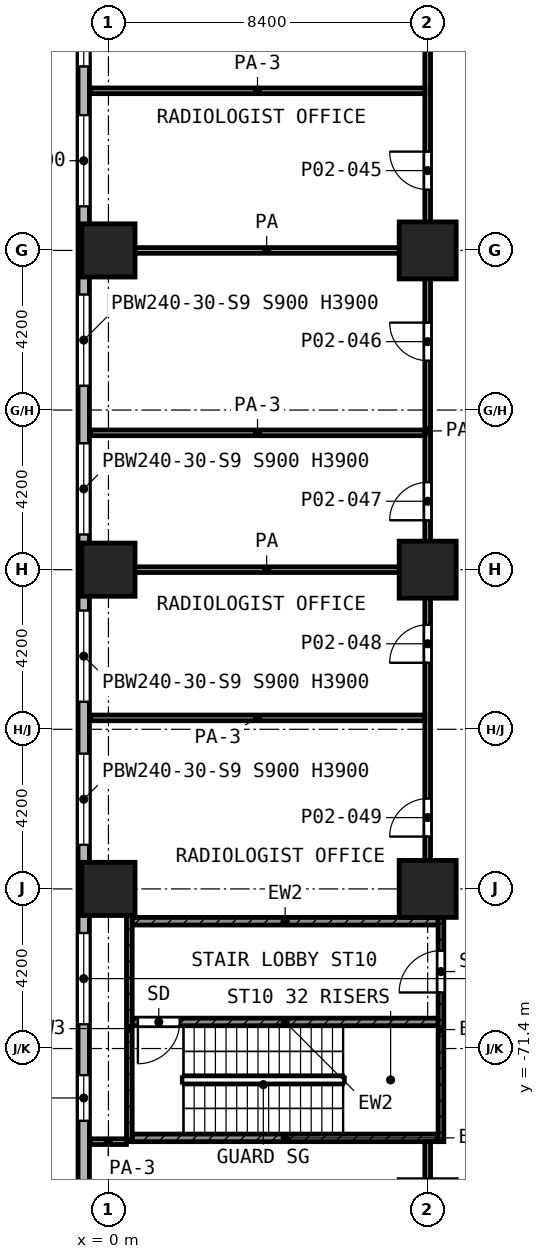
"""IFC4 building model, lengths in metres.
Left out: names, types, materials, properties, quantities, classifications, styles, units other than length and angle.
Written with IfcOpenShell. Run it as: python <this file> out.ifc"""

import sys

from ifc_helpers import new_model, si_unit, direction, frame, frame_2d, origin, origin_2d, place, context, subcontext, project, spatial, rectangle, extrude, element, fill, save


model = new_model("IFC4")
c1 = context("Model", 3, precision=1e-05, world=origin(), true_north=direction((0.0, 1.0)))
c2 = subcontext(c1, "Body", "Model", "MODEL_VIEW")
j1 = project(units=[si_unit("LENGTHUNIT", "METRE"), si_unit("PLANEANGLEUNIT", "RADIAN")], contexts=[c1])
p1 = place(None, origin())
s1 = spatial("IfcSite", under=j1, at=p1, CompositionType="ELEMENT")
p2 = place(p1, origin())
s2 = spatial("IfcBuilding", under=s1, at=p2, CompositionType="ELEMENT")
p3 = place(p2, frame((0.0, 0.0, 7.0)))
s3 = spatial("IfcBuildingStorey", under=s2, at=p3, CompositionType="ELEMENT", Elevation=7.0)
p4 = place(p3, frame((0.0, -50.4, 0.0), z_axis=(0.0, 0.0, 1.0), x_axis=(1.0, 0.0, 0.0)))
e1 = element("IfcColumn", 1, at=p4, inside=s3, PredefinedType="COLUMN", context=c2, shape_type="SweptSolid", body=[
    extrude(rectangle(XDim=1.4, YDim=1.4, at=origin_2d()), origin(), (0.0, 0.0, 1.0), 5.6),
])
p5 = place(p3, frame((8.4, -50.4, 0.0), z_axis=(0.0, 0.0, 1.0), x_axis=(1.0, 0.0, 0.0)))
e2 = element("IfcColumn", 2, at=p5, inside=s3, PredefinedType="COLUMN", context=c2, shape_type="SweptSolid", body=[
    extrude(rectangle(XDim=1.5, YDim=1.5, at=origin_2d()), origin(), (0.0, 0.0, 1.0), 5.6),
])
p6 = place(p3, frame((0.0, -58.8, 0.0), z_axis=(0.0, 0.0, 1.0), x_axis=(1.0, 0.0, 0.0)))
e3 = element("IfcColumn", 3, at=p6, inside=s3, PredefinedType="COLUMN", context=c2, shape_type="SweptSolid", body=[
    extrude(rectangle(XDim=1.4, YDim=1.4, at=origin_2d()), origin(), (0.0, 0.0, 1.0), 5.6),
])
p7 = place(p3, frame((8.4, -58.8, 0.0), z_axis=(0.0, 0.0, 1.0), x_axis=(1.0, 0.0, 0.0)))
e4 = element("IfcColumn", 4, at=p7, inside=s3, PredefinedType="COLUMN", context=c2, shape_type="SweptSolid", body=[
    extrude(rectangle(XDim=1.5, YDim=1.5, at=origin_2d()), origin(), (0.0, 0.0, 1.0), 5.6),
])
p8 = place(p3, frame((0.0, -67.2, 0.0), z_axis=(0.0, 0.0, 1.0), x_axis=(1.0, 0.0, 0.0)))
e5 = element("IfcColumn", 5, at=p8, inside=s3, PredefinedType="COLUMN", context=c2, shape_type="SweptSolid", body=[
    extrude(rectangle(XDim=1.4, YDim=1.4, at=origin_2d()), origin(), (0.0, 0.0, 1.0), 5.6),
])
p9 = place(p3, frame((8.4, -67.2, 0.0), z_axis=(0.0, 0.0, 1.0), x_axis=(1.0, 0.0, 0.0)))
e6 = element("IfcColumn", 6, at=p9, inside=s3, PredefinedType="COLUMN", context=c2, shape_type="SweptSolid", body=[
    extrude(rectangle(XDim=1.5, YDim=1.5, at=origin_2d()), origin(), (0.0, 0.0, 1.0), 5.6),
])
p10 = place(p3, frame((-0.65, -5.262, 0.0), z_axis=(0.0, 0.0, 1.0), x_axis=(0.0, -1.0, 0.0)))
e7 = element("IfcWall", 7, at=p10, inside=s3, PredefinedType="SOLIDWALL", context=c2, shape_type="SweptSolid", body=[
    extrude(rectangle(XDim=73.476, YDim=0.3, at=frame_2d((36.738, 0.0))), origin(), (0.0, 0.0, 1.0), 5.25),
])
p11 = place(p10, frame((1.61, 0.0, 0.9)))
e8 = element("IfcOpeningElement", 8, at=p11, cuts=e7, PredefinedType="OPENING", context=c2, shape_type="SweptSolid", body=[
    extrude(rectangle(XDim=1.2, YDim=3.0, at=frame_2d((0.6, 1.5))), frame((0.0, 0.16, 0.0), z_axis=(0.0, -1.0, 0.0), x_axis=(1.0, 0.0, 0.0)), (0.0, 0.0, 1.0), 0.32),
])
p12 = place(p10, frame((4.123, 0.0, 0.9)))
e9 = element("IfcOpeningElement", 9, at=p12, cuts=e7, PredefinedType="OPENING", context=c2, shape_type="SweptSolid", body=[
    extrude(rectangle(XDim=2.4, YDim=3.0, at=frame_2d((1.2, 1.5))), frame((0.0, 0.16, 0.0), z_axis=(0.0, -1.0, 0.0), x_axis=(1.0, 0.0, 0.0)), (0.0, 0.0, 1.0), 0.32),
])
p13 = place(p10, frame((7.978, 0.0, 0.9)))
e10 = element("IfcOpeningElement", 10, at=p13, cuts=e7, PredefinedType="OPENING", context=c2, shape_type="SweptSolid", body=[
    extrude(rectangle(XDim=2.4, YDim=3.0, at=frame_2d((1.2, 1.5))), frame((0.0, 0.16, 0.0), z_axis=(0.0, -1.0, 0.0), x_axis=(1.0, 0.0, 0.0)), (0.0, 0.0, 1.0), 0.32),
])
p14 = place(p10, frame((12.698, 0.0, 0.9)))
e11 = element("IfcOpeningElement", 11, at=p14, cuts=e7, PredefinedType="OPENING", context=c2, shape_type="SweptSolid", body=[
    extrude(rectangle(XDim=2.4, YDim=3.0, at=frame_2d((1.2, 1.5))), frame((0.0, 0.16, 0.0), z_axis=(0.0, -1.0, 0.0), x_axis=(1.0, 0.0, 0.0)), (0.0, 0.0, 1.0), 0.32),
])
p15 = place(p10, frame((16.378, 0.0, 0.9)))
e12 = element("IfcOpeningElement", 12, at=p15, cuts=e7, PredefinedType="OPENING", context=c2, shape_type="SweptSolid", body=[
    extrude(rectangle(XDim=2.4, YDim=3.0, at=frame_2d((1.2, 1.5))), frame((0.0, 0.16, 0.0), z_axis=(0.0, -1.0, 0.0), x_axis=(1.0, 0.0, 0.0)), (0.0, 0.0, 1.0), 0.32),
])
p16 = place(p10, frame((21.098, 0.0, 0.9)))
e13 = element("IfcOpeningElement", 13, at=p16, cuts=e7, PredefinedType="OPENING", context=c2, shape_type="SweptSolid", body=[
    extrude(rectangle(XDim=2.4, YDim=3.0, at=frame_2d((1.2, 1.5))), frame((0.0, 0.16, 0.0), z_axis=(0.0, -1.0, 0.0), x_axis=(1.0, 0.0, 0.0)), (0.0, 0.0, 1.0), 0.32),
])
p17 = place(p10, frame((24.863, 0.0, 0.9)))
e14 = element("IfcOpeningElement", 14, at=p17, cuts=e7, PredefinedType="OPENING", context=c2, shape_type="SweptSolid", body=[
    extrude(rectangle(XDim=2.4, YDim=3.0, at=frame_2d((1.2, 1.5))), frame((0.0, 0.16, 0.0), z_axis=(0.0, -1.0, 0.0), x_axis=(1.0, 0.0, 0.0)), (0.0, 0.0, 1.0), 0.32),
])
p18 = place(p10, frame((29.623, 0.0, 0.9)))
e15 = element("IfcOpeningElement", 15, at=p18, cuts=e7, PredefinedType="OPENING", context=c2, shape_type="SweptSolid", body=[
    extrude(rectangle(XDim=2.4, YDim=3.0, at=frame_2d((1.2, 1.5))), frame((0.0, 0.16, 0.0), z_axis=(0.0, -1.0, 0.0), x_axis=(1.0, 0.0, 0.0)), (0.0, 0.0, 1.0), 0.32),
])
p19 = place(p10, frame((33.178, 0.0, 0.9)))
e16 = element("IfcOpeningElement", 16, at=p19, cuts=e7, PredefinedType="OPENING", context=c2, shape_type="SweptSolid", body=[
    extrude(rectangle(XDim=2.4, YDim=3.0, at=frame_2d((1.2, 1.5))), frame((0.0, 0.16, 0.0), z_axis=(0.0, -1.0, 0.0), x_axis=(1.0, 0.0, 0.0)), (0.0, 0.0, 1.0), 0.32),
])
p20 = place(p10, frame((37.898, 0.0, 0.9)))
e17 = element("IfcOpeningElement", 17, at=p20, cuts=e7, PredefinedType="OPENING", context=c2, shape_type="SweptSolid", body=[
    extrude(rectangle(XDim=2.4, YDim=3.0, at=frame_2d((1.2, 1.5))), frame((0.0, 0.16, 0.0), z_axis=(0.0, -1.0, 0.0), x_axis=(1.0, 0.0, 0.0)), (0.0, 0.0, 1.0), 0.32),
])
p21 = place(p10, frame((41.578, 0.0, 0.9)))
e18 = element("IfcOpeningElement", 18, at=p21, cuts=e7, PredefinedType="OPENING", context=c2, shape_type="SweptSolid", body=[
    extrude(rectangle(XDim=2.4, YDim=3.0, at=frame_2d((1.2, 1.5))), frame((0.0, 0.16, 0.0), z_axis=(0.0, -1.0, 0.0), x_axis=(1.0, 0.0, 0.0)), (0.0, 0.0, 1.0), 0.32),
])
p22 = place(p10, frame((46.298, 0.0, 0.9)))
e19 = element("IfcOpeningElement", 19, at=p22, cuts=e7, PredefinedType="OPENING", context=c2, shape_type="SweptSolid", body=[
    extrude(rectangle(XDim=2.4, YDim=3.0, at=frame_2d((1.2, 1.5))), frame((0.0, 0.16, 0.0), z_axis=(0.0, -1.0, 0.0), x_axis=(1.0, 0.0, 0.0)), (0.0, 0.0, 1.0), 0.32),
])
p23 = place(p10, frame((50.213, 0.0, 0.9)))
e20 = element("IfcOpeningElement", 20, at=p23, cuts=e7, PredefinedType="OPENING", context=c2, shape_type="SweptSolid", body=[
    extrude(rectangle(XDim=2.4, YDim=3.0, at=frame_2d((1.2, 1.5))), frame((0.0, 0.16, 0.0), z_axis=(0.0, -1.0, 0.0), x_axis=(1.0, 0.0, 0.0)), (0.0, 0.0, 1.0), 0.32),
])
p24 = place(p10, frame((54.613, 0.0, 0.9)))
e21 = element("IfcOpeningElement", 21, at=p24, cuts=e7, PredefinedType="OPENING", context=c2, shape_type="SweptSolid", body=[
    extrude(rectangle(XDim=2.4, YDim=3.0, at=frame_2d((1.2, 1.5))), frame((0.0, 0.16, 0.0), z_axis=(0.0, -1.0, 0.0), x_axis=(1.0, 0.0, 0.0)), (0.0, 0.0, 1.0), 0.32),
])
p25 = place(p10, frame((58.378, 0.0, 0.9)))
e22 = element("IfcOpeningElement", 22, at=p25, cuts=e7, PredefinedType="OPENING", context=c2, shape_type="SweptSolid", body=[
    extrude(rectangle(XDim=2.4, YDim=3.0, at=frame_2d((1.2, 1.5))), frame((0.0, 0.16, 0.0), z_axis=(0.0, -1.0, 0.0), x_axis=(1.0, 0.0, 0.0)), (0.0, 0.0, 1.0), 0.32),
])
p26 = place(p10, frame((63.098, 0.0, 0.9)))
e23 = element("IfcOpeningElement", 23, at=p26, cuts=e7, PredefinedType="OPENING", context=c2, shape_type="SweptSolid", body=[
    extrude(rectangle(XDim=2.4, YDim=3.0, at=frame_2d((1.2, 1.5))), frame((0.0, 0.16, 0.0), z_axis=(0.0, -1.0, 0.0), x_axis=(1.0, 0.0, 0.0)), (0.0, 0.0, 1.0), 0.32),
])
p27 = place(p10, frame((66.838, 0.0, 0.9)))
e24 = element("IfcOpeningElement", 24, at=p27, cuts=e7, PredefinedType="OPENING", context=c2, shape_type="SweptSolid", body=[
    extrude(rectangle(XDim=1.2, YDim=3.0, at=frame_2d((0.6, 1.5))), frame((0.0, 0.16, 0.0), z_axis=(0.0, -1.0, 0.0), x_axis=(1.0, 0.0, 0.0)), (0.0, 0.0, 1.0), 0.32),
])
p28 = place(p10, frame((70.665, 0.0, 0.9)))
e25 = element("IfcOpeningElement", 25, at=p28, cuts=e7, PredefinedType="OPENING", context=c2, shape_type="SweptSolid", body=[
    extrude(rectangle(XDim=1.2, YDim=3.0, at=frame_2d((0.6, 1.5))), frame((0.0, 0.16, 0.0), z_axis=(0.0, -1.0, 0.0), x_axis=(1.0, 0.0, 0.0)), (0.0, 0.0, 1.0), 0.32),
])
p29 = place(p3, frame((0.55, -73.85, 0.0), z_axis=(0.0, 0.0, 1.0), x_axis=(0.0, 1.0, 0.0)))
e26 = element("IfcWall", 26, at=p29, inside=s3, PredefinedType="SHEAR", context=c2, shape_type="SweptSolid", body=[
    extrude(rectangle(XDim=5.95, YDim=0.15, at=frame_2d((2.975, 0.0))), origin(), (0.0, 0.0, 1.0), 5.25),
])
p30 = place(p3, frame((8.75, -73.85, 0.0), z_axis=(0.0, 0.0, 1.0), x_axis=(0.0, 1.0, 0.0)))
e27 = element("IfcWall", 27, at=p30, inside=s3, PredefinedType="SHEAR", context=c2, shape_type="SweptSolid", body=[
    extrude(rectangle(XDim=5.9, YDim=0.15, at=frame_2d((2.95, 0.0))), origin(), (0.0, 0.0, 1.0), 5.25),
])
p31 = place(p30, frame((3.925, 0.0, 0.0)))
e28 = element("IfcOpeningElement", 28, at=p31, cuts=e27, PredefinedType="OPENING", context=c2, shape_type="SweptSolid", body=[
    extrude(rectangle(XDim=1.1, YDim=2.1, at=frame_2d((0.55, 1.05))), frame((0.0, 0.085, 0.0), z_axis=(0.0, -1.0, 0.0), x_axis=(1.0, 0.0, 0.0)), (0.0, 0.0, 1.0), 0.17),
])
p32 = place(p3, frame((0.625, -73.75, 0.0), z_axis=(0.0, 0.0, 1.0), x_axis=(1.0, 0.0, 0.0)))
e29 = element("IfcWall", 29, at=p32, inside=s3, PredefinedType="SHEAR", context=c2, shape_type="SweptSolid", body=[
    extrude(rectangle(XDim=8.05, YDim=0.2, at=frame_2d((4.025, 0.0))), origin(), (0.0, 0.0, 1.0), 5.25),
])
p33 = place(p3, frame((0.625, -70.7, 0.0), z_axis=(0.0, 0.0, 1.0), x_axis=(1.0, 0.0, 0.0)))
e30 = element("IfcWall", 30, at=p33, inside=s3, PredefinedType="SHEAR", context=c2, shape_type="SweptSolid", body=[
    extrude(rectangle(XDim=8.05, YDim=0.2, at=frame_2d((4.025, 0.0))), origin(), (0.0, 0.0, 1.0), 5.25),
])
p34 = place(p33, frame((0.15, 0.0, 0.0)))
e31 = element("IfcOpeningElement", 31, at=p34, cuts=e30, PredefinedType="OPENING", context=c2, shape_type="SweptSolid", body=[
    extrude(rectangle(XDim=1.1, YDim=2.1, at=frame_2d((0.55, 1.05))), frame((0.0, 0.11, 0.0), z_axis=(0.0, -1.0, 0.0), x_axis=(1.0, 0.0, 0.0)), (0.0, 0.0, 1.0), 0.22),
])
p35 = place(p3, frame((0.625, -68.05, 0.0), z_axis=(0.0, 0.0, 1.0), x_axis=(1.0, 0.0, 0.0)))
e32 = element("IfcWall", 32, at=p35, inside=s3, PredefinedType="SHEAR", context=c2, shape_type="SweptSolid", body=[
    extrude(rectangle(XDim=8.05, YDim=0.2, at=frame_2d((4.025, 0.0))), origin(), (0.0, 0.0, 1.0), 5.25),
])
p36 = place(p3, frame((-0.48, -73.85, 0.0), z_axis=(0.0, 0.0, 1.0), x_axis=(1.0, 0.0, 0.0)))
e33 = element("IfcWall", 33, at=p36, inside=s3, PredefinedType="PARTITIONING", context=c2, shape_type="SweptSolid", body=[
    extrude(rectangle(XDim=0.953, YDim=0.15, at=frame_2d((0.477, 0.0))), origin(), (0.0, 0.0, 1.0), 3.85),
])
p37 = place(p3, frame((-0.48, -62.7, 0.0), z_axis=(0.0, 0.0, 1.0), x_axis=(1.0, 0.0, 0.0)))
e34 = element("IfcWall", 34, at=p37, inside=s3, PredefinedType="PARTITIONING", context=c2, shape_type="SweptSolid", body=[
    extrude(rectangle(XDim=8.805, YDim=0.15, at=frame_2d((4.402, 0.0))), origin(), (0.0, 0.0, 1.0), 3.85),
])
p38 = place(p3, frame((0.002, -58.8, 0.0), z_axis=(0.0, 0.0, 1.0), x_axis=(1.0, 0.0, 0.0)))
e35 = element("IfcWall", 35, at=p38, inside=s3, PredefinedType="PARTITIONING", context=c2, shape_type="SweptSolid", body=[
    extrude(rectangle(XDim=8.323, YDim=0.15, at=frame_2d((4.162, 0.0))), origin(), (0.0, 0.0, 1.0), 5.25),
])
p39 = place(p3, frame((-0.48, -55.2, 0.0), z_axis=(0.0, 0.0, 1.0), x_axis=(1.0, 0.0, 0.0)))
e36 = element("IfcWall", 36, at=p39, inside=s3, PredefinedType="PARTITIONING", context=c2, shape_type="SweptSolid", body=[
    extrude(rectangle(XDim=8.805, YDim=0.15, at=frame_2d((4.402, 0.0))), origin(), (0.0, 0.0, 1.0), 3.85),
])
p40 = place(p3, frame((0.002, -50.4, 0.0), z_axis=(0.0, 0.0, 1.0), x_axis=(1.0, 0.0, 0.0)))
e37 = element("IfcWall", 37, at=p40, inside=s3, PredefinedType="PARTITIONING", context=c2, shape_type="SweptSolid", body=[
    extrude(rectangle(XDim=8.323, YDim=0.15, at=frame_2d((4.162, 0.0))), origin(), (0.0, 0.0, 1.0), 5.25),
])
p41 = place(p3, frame((-0.48, -46.2, 0.0), z_axis=(0.0, 0.0, 1.0), x_axis=(1.0, 0.0, 0.0)))
e38 = element("IfcWall", 38, at=p41, inside=s3, PredefinedType="PARTITIONING", context=c2, shape_type="SweptSolid", body=[
    extrude(rectangle(XDim=8.805, YDim=0.15, at=frame_2d((4.402, 0.0))), origin(), (0.0, 0.0, 1.0), 3.85),
])
p42 = place(p3, frame((8.4, -84.48, 0.0), z_axis=(0.0, 0.0, 1.0), x_axis=(0.0, 1.0, 0.0)))
e39 = element("IfcWall", 39, at=p42, inside=s3, PredefinedType="PARTITIONING", context=c2, shape_type="SweptSolid", body=[
    extrude(rectangle(XDim=10.63, YDim=0.15, at=frame_2d((5.315, 0.0))), origin(), (0.0, 0.0, 1.0), 3.85),
])
p43 = place(p42, frame((7.055, 0.0, 0.0)))
e40 = element("IfcOpeningElement", 40, at=p43, cuts=e39, PredefinedType="OPENING", context=c2, shape_type="SweptSolid", body=[
    extrude(rectangle(XDim=1.0, YDim=2.1, at=frame_2d((0.5, 1.05))), frame((0.0, 0.085, 0.0), z_axis=(0.0, -1.0, 0.0), x_axis=(1.0, 0.0, 0.0)), (0.0, 0.0, 1.0), 0.17),
])
p44 = place(p42, frame((1.98, 0.0, 0.0)))
e41 = element("IfcOpeningElement", 41, at=p44, cuts=e39, PredefinedType="OPENING", context=c2, shape_type="SweptSolid", body=[
    extrude(rectangle(XDim=1.0, YDim=2.1, at=frame_2d((0.5, 1.05))), frame((0.0, 0.085, 0.0), z_axis=(0.0, -1.0, 0.0), x_axis=(1.0, 0.0, 0.0)), (0.0, 0.0, 1.0), 0.17),
])
p45 = place(p3, frame((8.4, -67.947, 0.0), z_axis=(0.0, 0.0, 1.0), x_axis=(0.0, 1.0, 0.0)))
e42 = element("IfcWall", 42, at=p45, inside=s3, PredefinedType="PARTITIONING", context=c2, shape_type="SweptSolid", body=[
    extrude(rectangle(XDim=25.597, YDim=0.15, at=frame_2d((12.798, 0.0))), origin(), (0.0, 0.0, 1.0), 5.25),
])
p46 = place(p45, frame((19.147, 0.0, 0.0)))
e43 = element("IfcOpeningElement", 43, at=p46, cuts=e42, PredefinedType="OPENING", context=c2, shape_type="SweptSolid", body=[
    extrude(rectangle(XDim=1.0, YDim=2.1, at=frame_2d((0.5, 1.05))), frame((0.0, 0.085, 0.0), z_axis=(0.0, -1.0, 0.0), x_axis=(1.0, 0.0, 0.0)), (0.0, 0.0, 1.0), 0.17),
])
p47 = place(p45, frame((14.647, 0.0, 0.0)))
e44 = element("IfcOpeningElement", 44, at=p47, cuts=e42, PredefinedType="OPENING", context=c2, shape_type="SweptSolid", body=[
    extrude(rectangle(XDim=1.0, YDim=2.1, at=frame_2d((0.5, 1.05))), frame((0.0, 0.085, 0.0), z_axis=(0.0, -1.0, 0.0), x_axis=(1.0, 0.0, 0.0)), (0.0, 0.0, 1.0), 0.17),
])
p48 = place(p45, frame((10.447, 0.0, 0.0)))
e45 = element("IfcOpeningElement", 45, at=p48, cuts=e42, PredefinedType="OPENING", context=c2, shape_type="SweptSolid", body=[
    extrude(rectangle(XDim=1.0, YDim=2.1, at=frame_2d((0.5, 1.05))), frame((0.0, 0.085, 0.0), z_axis=(0.0, -1.0, 0.0), x_axis=(1.0, 0.0, 0.0)), (0.0, 0.0, 1.0), 0.17),
])
p49 = place(p45, frame((6.697, 0.0, 0.0)))
e46 = element("IfcOpeningElement", 46, at=p49, cuts=e42, PredefinedType="OPENING", context=c2, shape_type="SweptSolid", body=[
    extrude(rectangle(XDim=1.0, YDim=2.1, at=frame_2d((0.5, 1.05))), frame((0.0, 0.085, 0.0), z_axis=(0.0, -1.0, 0.0), x_axis=(1.0, 0.0, 0.0)), (0.0, 0.0, 1.0), 0.17),
])
p50 = place(p45, frame((2.124, 0.0, 0.0)))
e47 = element("IfcOpeningElement", 47, at=p50, cuts=e42, PredefinedType="OPENING", context=c2, shape_type="SweptSolid", body=[
    extrude(rectangle(XDim=1.0, YDim=2.1, at=frame_2d((0.5, 1.05))), frame((0.0, 0.085, 0.0), z_axis=(0.0, -1.0, 0.0), x_axis=(1.0, 0.0, 0.0)), (0.0, 0.0, 1.0), 0.17),
])
p51 = place(p20, origin())
e48 = element("IfcWindow", 48, at=p51, inside=s3, PartitioningType="SINGLE_PANEL", PredefinedType="WINDOW", context=c2, shape_type="SweptSolid", body=[
    extrude(rectangle(XDim=2.4, YDim=3.0, at=frame_2d((1.2, 1.5))), frame((0.0, 0.03, 0.0), z_axis=(0.0, -1.0, 0.0), x_axis=(1.0, 0.0, 0.0)), (0.0, 0.0, 1.0), 0.06),
])
fill(e17, e48)
p52 = place(p21, origin())
e49 = element("IfcWindow", 49, at=p52, inside=s3, PartitioningType="SINGLE_PANEL", PredefinedType="WINDOW", context=c2, shape_type="SweptSolid", body=[
    extrude(rectangle(XDim=2.4, YDim=3.0, at=frame_2d((1.2, 1.5))), frame((0.0, 0.03, 0.0), z_axis=(0.0, -1.0, 0.0), x_axis=(1.0, 0.0, 0.0)), (0.0, 0.0, 1.0), 0.06),
])
fill(e18, e49)
p53 = place(p22, origin())
e50 = element("IfcWindow", 50, at=p53, inside=s3, PartitioningType="SINGLE_PANEL", PredefinedType="WINDOW", context=c2, shape_type="SweptSolid", body=[
    extrude(rectangle(XDim=2.4, YDim=3.0, at=frame_2d((1.2, 1.5))), frame((0.0, 0.03, 0.0), z_axis=(0.0, -1.0, 0.0), x_axis=(1.0, 0.0, 0.0)), (0.0, 0.0, 1.0), 0.06),
])
fill(e19, e50)
p54 = place(p23, origin())
e51 = element("IfcWindow", 51, at=p54, inside=s3, PartitioningType="SINGLE_PANEL", PredefinedType="WINDOW", context=c2, shape_type="SweptSolid", body=[
    extrude(rectangle(XDim=2.4, YDim=3.0, at=frame_2d((1.2, 1.5))), frame((0.0, 0.03, 0.0), z_axis=(0.0, -1.0, 0.0), x_axis=(1.0, 0.0, 0.0)), (0.0, 0.0, 1.0), 0.06),
])
fill(e20, e51)
p55 = place(p24, origin())
e52 = element("IfcWindow", 52, at=p55, inside=s3, PartitioningType="SINGLE_PANEL", PredefinedType="WINDOW", context=c2, shape_type="SweptSolid", body=[
    extrude(rectangle(XDim=2.4, YDim=3.0, at=frame_2d((1.2, 1.5))), frame((0.0, 0.03, 0.0), z_axis=(0.0, -1.0, 0.0), x_axis=(1.0, 0.0, 0.0)), (0.0, 0.0, 1.0), 0.06),
])
fill(e21, e52)
p56 = place(p25, origin())
e53 = element("IfcWindow", 53, at=p56, inside=s3, PartitioningType="SINGLE_PANEL", PredefinedType="WINDOW", context=c2, shape_type="SweptSolid", body=[
    extrude(rectangle(XDim=2.4, YDim=3.0, at=frame_2d((1.2, 1.5))), frame((0.0, 0.03, 0.0), z_axis=(0.0, -1.0, 0.0), x_axis=(1.0, 0.0, 0.0)), (0.0, 0.0, 1.0), 0.06),
])
fill(e22, e53)
p57 = place(p26, origin())
e54 = element("IfcWindow", 54, at=p57, inside=s3, PartitioningType="SINGLE_PANEL", PredefinedType="WINDOW", context=c2, shape_type="SweptSolid", body=[
    extrude(rectangle(XDim=2.4, YDim=3.0, at=frame_2d((1.2, 1.5))), frame((0.0, 0.03, 0.0), z_axis=(0.0, -1.0, 0.0), x_axis=(1.0, 0.0, 0.0)), (0.0, 0.0, 1.0), 0.06),
])
fill(e23, e54)
p58 = place(p27, origin())
e55 = element("IfcWindow", 55, at=p58, inside=s3, PartitioningType="SINGLE_PANEL", PredefinedType="WINDOW", context=c2, shape_type="SweptSolid", body=[
    extrude(rectangle(XDim=1.2, YDim=3.0, at=frame_2d((0.6, 1.5))), frame((0.0, 0.03, 0.0), z_axis=(0.0, -1.0, 0.0), x_axis=(1.0, 0.0, 0.0)), (0.0, 0.0, 1.0), 0.06),
])
fill(e24, e55)
p59 = place(p34, frame((1.1, 0.0, 0.0), z_axis=(0.0, 0.0, 1.0), x_axis=(-1.0, 0.0, 0.0)))
e56 = element("IfcDoor", 56, at=p59, inside=s3, OperationType="SINGLE_SWING_LEFT", PredefinedType="DOOR", context=c2, shape_type="SweptSolid", body=[
    extrude(rectangle(XDim=1.1, YDim=2.1, at=frame_2d((0.55, 1.05))), frame((0.0, 0.025, 0.0), z_axis=(0.0, -1.0, 0.0), x_axis=(1.0, 0.0, 0.0)), (0.0, 0.0, 1.0), 0.05),
])
fill(e31, e56)
p60 = place(p31, origin())
e57 = element("IfcDoor", 57, at=p60, inside=s3, OperationType="SINGLE_SWING_LEFT", PredefinedType="DOOR", context=c2, shape_type="SweptSolid", body=[
    extrude(rectangle(XDim=1.1, YDim=2.1, at=frame_2d((0.55, 1.05))), frame((0.0, 0.025, 0.0), z_axis=(0.0, -1.0, 0.0), x_axis=(1.0, 0.0, 0.0)), (0.0, 0.0, 1.0), 0.05),
])
fill(e28, e57)
p61 = place(p46, origin())
e58 = element("IfcDoor", 58, at=p61, inside=s3, OperationType="SINGLE_SWING_RIGHT", PredefinedType="DOOR", context=c2, shape_type="SweptSolid", body=[
    extrude(rectangle(XDim=1.0, YDim=2.1, at=frame_2d((0.5, 1.05))), frame((0.0, 0.025, 0.0), z_axis=(0.0, -1.0, 0.0), x_axis=(1.0, 0.0, 0.0)), (0.0, 0.0, 1.0), 0.05),
])
fill(e43, e58)
p62 = place(p47, origin())
e59 = element("IfcDoor", 59, at=p62, inside=s3, OperationType="SINGLE_SWING_RIGHT", PredefinedType="DOOR", context=c2, shape_type="SweptSolid", body=[
    extrude(rectangle(XDim=1.0, YDim=2.1, at=frame_2d((0.5, 1.05))), frame((0.0, 0.025, 0.0), z_axis=(0.0, -1.0, 0.0), x_axis=(1.0, 0.0, 0.0)), (0.0, 0.0, 1.0), 0.05),
])
fill(e44, e59)
p63 = place(p48, origin())
e60 = element("IfcDoor", 60, at=p63, inside=s3, OperationType="SINGLE_SWING_LEFT", PredefinedType="DOOR", context=c2, shape_type="SweptSolid", body=[
    extrude(rectangle(XDim=1.0, YDim=2.1, at=frame_2d((0.5, 1.05))), frame((0.0, 0.025, 0.0), z_axis=(0.0, -1.0, 0.0), x_axis=(1.0, 0.0, 0.0)), (0.0, 0.0, 1.0), 0.05),
])
fill(e45, e60)
p64 = place(p49, origin())
e61 = element("IfcDoor", 61, at=p64, inside=s3, OperationType="SINGLE_SWING_LEFT", PredefinedType="DOOR", context=c2, shape_type="SweptSolid", body=[
    extrude(rectangle(XDim=1.0, YDim=2.1, at=frame_2d((0.5, 1.05))), frame((0.0, 0.025, 0.0), z_axis=(0.0, -1.0, 0.0), x_axis=(1.0, 0.0, 0.0)), (0.0, 0.0, 1.0), 0.05),
])
fill(e46, e61)
p65 = place(p50, origin())
e62 = element("IfcDoor", 62, at=p65, inside=s3, OperationType="SINGLE_SWING_LEFT", PredefinedType="DOOR", context=c2, shape_type="SweptSolid", body=[
    extrude(rectangle(XDim=1.0, YDim=2.1, at=frame_2d((0.5, 1.05))), frame((0.0, 0.025, 0.0), z_axis=(0.0, -1.0, 0.0), x_axis=(1.0, 0.0, 0.0)), (0.0, 0.0, 1.0), 0.05),
])
fill(e47, e62)
save(model, sys.argv[1])
